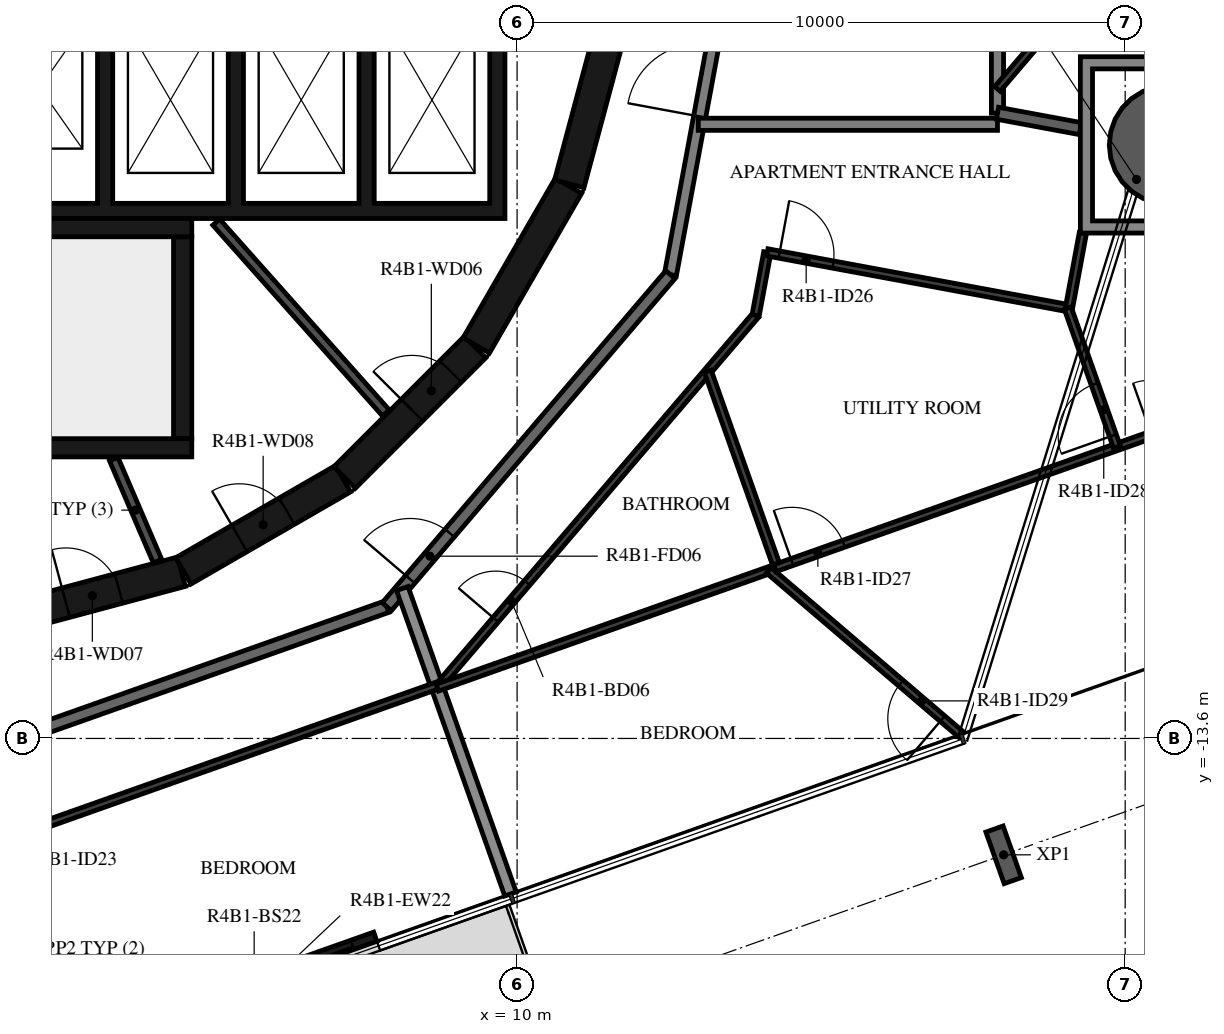
"""IFC4 building model, lengths in metres.
Left out: names, types, materials, properties, quantities, classifications, styles, units other than length and angle.
Written with IfcOpenShell. Run it as: python <this file> out.ifc"""

import sys

from ifc_helpers import new_model, si_unit, direction, frame, frame_2d, origin, origin_2d, place, context, subcontext, project, spatial, polyline, rectangle, hollow_circle, i_section, outline, extrude, element, fill, save


model = new_model("IFC4")
c1 = context("Model", 3, precision=1e-05, world=origin(), true_north=direction((0.0, 1.0)))
c2 = subcontext(c1, "Body", "Model", "MODEL_VIEW")
j1 = project(units=[si_unit("LENGTHUNIT", "METRE"), si_unit("PLANEANGLEUNIT", "RADIAN")], contexts=[c1])
p1 = place(None, origin())
s1 = spatial("IfcSite", under=j1, at=p1, CompositionType="ELEMENT")
p2 = place(p1, origin())
s2 = spatial("IfcBuilding", under=s1, at=p2, CompositionType="ELEMENT")
p3 = place(p2, frame((0.0, 0.0, 162.2)))
s3 = spatial("IfcBuildingStorey", under=s2, at=p3, CompositionType="ELEMENT", Elevation=162.2)
p4 = place(p3, frame((20.713, -3.839, -0.38), z_axis=(0.0, 0.0, 1.0), x_axis=(1.0, 0.0, 0.0)))
e1 = element("IfcColumn", 1, at=p4, inside=s3, PredefinedType="COLUMN", context=c2, shape_type="SweptSolid", body=[
    extrude(hollow_circle(Radius=0.975, WallThickness=0.045, at=origin_2d()), origin(), (0.0, 0.0, 1.0), 3.5),
])
p5 = place(p3, frame((18.001, -15.514, -0.38), z_axis=(0.0, 0.0, 1.0), x_axis=(-0.942641392079, -0.333807138839, 0.0)))
e2 = element("IfcColumn", 2, at=p5, inside=s3, PredefinedType="COLUMN", context=c2, shape_type="SweptSolid", body=[
    extrude(i_section(OverallWidth=0.3, OverallDepth=0.9, WebThickness=0.019, FlangeThickness=0.035, FilletRadius=0.03, at=origin_2d()), origin(), (0.0, 0.0, 1.0), 3.5),
])
p6 = place(p3, frame((4.652, -17.929, 0.0), z_axis=(0.0, 0.0, 1.0), x_axis=(0.942620722428, 0.333865502335, 0.0)))
e3 = element("IfcWall", 3, at=p6, inside=s3, PredefinedType="STANDARD", context=c2, shape_type="SweptSolid", body=[
    extrude(rectangle(XDim=3.2, YDim=0.16, at=frame_2d((1.6, 0.0))), origin(), (0.0, 0.0, 1.0), 3.12),
])
p7 = place(p6, frame((0.4, 0.0, 0.0)))
e4 = element("IfcOpeningElement", 4, at=p7, cuts=e3, PredefinedType="OPENING", context=c2, shape_type="SweptSolid", body=[
    extrude(rectangle(XDim=2.4, YDim=2.4, at=frame_2d((1.2, 1.2))), frame((0.0, 0.09, 0.0), z_axis=(0.0, -1.0, 0.0), x_axis=(1.0, 0.0, 0.0)), (0.0, 0.0, 1.0), 0.18),
])
p8 = place(p3, frame((1.55, -11.643, 0.0), z_axis=(0.0, 0.0, 1.0), x_axis=(0.965948410781, 0.258734743916, 0.0)))
e5 = element("IfcWall", 5, at=p8, inside=s3, PredefinedType="SHEAR", context=c2, shape_type="SweptSolid", body=[
    extrude(rectangle(XDim=3.033, YDim=0.5, at=frame_2d((1.516, 0.0))), origin(), (0.0, 0.0, 1.0), 3.12),
])
p9 = place(p8, frame((1.066, 0.0, 0.0)))
e6 = element("IfcOpeningElement", 6, at=p9, cuts=e5, PredefinedType="OPENING", context=c2, shape_type="SweptSolid", body=[
    extrude(rectangle(XDim=0.9, YDim=2.1, at=frame_2d((0.45, 1.05))), frame((0.0, 0.26, 0.0), z_axis=(0.0, -1.0, 0.0), x_axis=(1.0, 0.0, 0.0)), (0.0, 0.0, 1.0), 0.52),
])
p10 = place(p3, frame((4.51, -10.845, 0.0), z_axis=(0.0, 0.0, 1.0), x_axis=(0.865975092491, 0.500087131594, 0.0)))
e7 = element("IfcWall", 7, at=p10, inside=s3, PredefinedType="SHEAR", context=c2, shape_type="SweptSolid", body=[
    extrude(rectangle(XDim=3.033, YDim=0.5, at=frame_2d((1.516, 0.0))), origin(), (0.0, 0.0, 1.0), 3.12),
])
p11 = place(p10, frame((1.066, 0.0, 0.0)))
e8 = element("IfcOpeningElement", 8, at=p11, cuts=e7, PredefinedType="OPENING", context=c2, shape_type="SweptSolid", body=[
    extrude(rectangle(XDim=0.9, YDim=2.1, at=frame_2d((0.45, 1.05))), frame((0.0, 0.26, 0.0), z_axis=(0.0, -1.0, 0.0), x_axis=(1.0, 0.0, 0.0)), (0.0, 0.0, 1.0), 0.52),
])
p12 = place(p3, frame((7.164, -9.308, 0.0), z_axis=(0.0, 0.0, 1.0), x_axis=(0.707106781187, 0.707106781187, 0.0)))
e9 = element("IfcWall", 9, at=p12, inside=s3, PredefinedType="SHEAR", context=c2, shape_type="SweptSolid", body=[
    extrude(rectangle(XDim=3.032, YDim=0.5, at=frame_2d((1.516, 0.0))), origin(), (0.0, 0.0, 1.0), 3.12),
])
p13 = place(p12, frame((1.566, 0.0, 0.0)))
e10 = element("IfcOpeningElement", 10, at=p13, cuts=e9, PredefinedType="OPENING", context=c2, shape_type="SweptSolid", body=[
    extrude(rectangle(XDim=0.9, YDim=2.1, at=frame_2d((0.45, 1.05))), frame((0.0, 0.26, 0.0), z_axis=(0.0, -1.0, 0.0), x_axis=(1.0, 0.0, 0.0)), (0.0, 0.0, 1.0), 0.52),
])
for number, where, z_axis, x_axis in (
    (11, (9.329, -7.137, 0.0), (0.0, 0.0, 1.0), (0.5, 0.866, 0.0)),
    (12, (10.858, -4.479, 0.0), (0.0, 0.0, 1.0), (0.259, 0.966, 0.0)),
):
    element("IfcWall", number, at=place(p3, frame(where, z_axis=z_axis, x_axis=x_axis)), inside=s3, PredefinedType="SHEAR", context=c2, shape_type="SweptSolid", body=[
        extrude(rectangle(XDim=3.033, YDim=0.5, at=frame_2d((1.516, 0.0))), origin(), (0.0, 0.0, 1.0), 3.12),
    ])
p14 = place(p3, frame((-2.4, -5.2, 0.0), z_axis=(0.0, 0.0, 1.0), x_axis=(1.0, 0.0, 0.0)))
e13 = element("IfcWall", 13, at=p14, inside=s3, PredefinedType="SHEAR", context=c2, shape_type="SweptSolid", body=[
    extrude(rectangle(XDim=7.05, YDim=0.3, at=frame_2d((3.525, 0.0))), origin(), (0.0, 0.0, 1.0), 3.12),
])
p15 = place(p3, frame((4.5, -8.67, 0.0), z_axis=(0.0, 0.0, 1.0), x_axis=(0.0, 1.0, 0.0)))
e14 = element("IfcWall", 14, at=p15, inside=s3, PredefinedType="SHEAR", context=c2, shape_type="SweptSolid", body=[
    extrude(rectangle(XDim=3.32, YDim=0.3, at=frame_2d((1.66, 0.0))), origin(), (0.0, 0.0, 1.0), 3.12),
])
p16 = place(p3, frame((0.1, -8.82, 0.0), z_axis=(0.0, 0.0, 1.0), x_axis=(1.0, 0.0, 0.0)))
e15 = element("IfcWall", 15, at=p16, inside=s3, PredefinedType="SHEAR", context=c2, shape_type="SweptSolid", body=[
    extrude(rectangle(XDim=4.55, YDim=0.3, at=frame_2d((2.275, 0.0))), origin(), (0.0, 0.0, 1.0), 3.12),
])
p17 = place(p3, origin())
e16 = element("IfcWall", 16, at=p17, inside=s3, PredefinedType="SHEAR", context=c2, shape_type="SweptSolid", body=[
    extrude(outline(polyline([(9.8, -5.05), (9.8, -4.8), (9.8, -1.9), (9.55, -1.9), (9.55, -4.8), (7.65, -4.8), (7.65, -1.9), (7.4, -1.9), (7.4, -4.8), (5.5, -4.8), (5.5, -1.9), (5.25, -1.9), (5.25, -4.8), (3.35, -4.8), (3.35, -1.9), (3.1, -1.9), (3.1, -4.8), (1.2, -4.8), (1.2, -1.9), (0.95, -1.9), (0.95, -4.8), (-5.25, -4.8), (-5.25, -1.9), (-5.5, -1.9), (-5.5, -4.8), (-7.4, -4.8), (-7.4, -1.9), (-7.65, -1.9), (-7.65, -4.8), (-9.55, -4.8), (-9.55, -1.9), (-9.8, -1.9), (-9.8, -4.8), (-9.8, -5.05), (9.8, -5.05)])), origin(), (0.0, 0.0, 1.0), 3.12),
])
p18 = place(p3, frame((7.842, -8.248, 0.0), z_axis=(0.0, 0.0, 1.0), x_axis=(-0.66446128181, 0.747322691329, 0.0)))
e17 = element("IfcWall", 17, at=p18, inside=s3, PredefinedType="PARTITIONING", context=c2, shape_type="SweptSolid", body=[
    extrude(rectangle(XDim=4.198, YDim=0.15, at=frame_2d((2.099, 0.0))), origin(), (0.0, 0.0, 1.0), 3.12),
])
p19 = place(p3, frame((3.367, -9.007, 0.0), z_axis=(0.0, 0.0, 1.0), x_axis=(0.394387482265, -0.918944238696, 0.0)))
e18 = element("IfcWall", 18, at=p19, inside=s3, PredefinedType="PARTITIONING", context=c2, shape_type="SweptSolid", body=[
    extrude(rectangle(XDim=1.825, YDim=0.15, at=frame_2d((0.913, 0.0))), origin(), (0.0, 0.0, 1.0), 3.12),
])
p20 = place(p3, frame((12.521, -5.972, 0.0), z_axis=(0.0, 0.0, 1.0), x_axis=(0.182244189886, 0.983253301674, 0.0)))
e19 = element("IfcWall", 19, at=p20, inside=s3, PredefinedType="STANDARD", context=c2, shape_type="SweptSolid", body=[
    extrude(rectangle(XDim=4.176, YDim=0.2, at=frame_2d((2.088, 0.0))), origin(), (0.0, 0.0, 1.0), 3.12),
])
p21 = place(p20, frame((2.645, 0.0, 0.0)))
e20 = element("IfcOpeningElement", 20, at=p21, cuts=e19, PredefinedType="OPENING", context=c2, shape_type="SweptSolid", body=[
    extrude(rectangle(XDim=1.2, YDim=2.1, at=frame_2d((0.6, 1.05))), frame((0.0, 0.11, 0.0), z_axis=(0.0, -1.0, 0.0), x_axis=(1.0, 0.0, 0.0)), (0.0, 0.0, 1.0), 0.22),
])
p22 = place(p3, frame((1.088, -13.83, 0.0), z_axis=(0.0, 0.0, 1.0), x_axis=(0.942648397945, 0.333787354241, 0.0)))
e21 = element("IfcWall", 21, at=p22, inside=s3, PredefinedType="STANDARD", context=c2, shape_type="SweptSolid", body=[
    extrude(rectangle(XDim=7.181, YDim=0.2, at=frame_2d((3.591, 0.0))), origin(), (0.0, 0.0, 1.0), 3.12),
])
p23 = place(p3, frame((7.858, -11.433, 0.0), z_axis=(0.0, 0.0, 1.0), x_axis=(0.649440801937, 0.760412154545, 0.0)))
e22 = element("IfcWall", 22, at=p23, inside=s3, PredefinedType="STANDARD", context=c2, shape_type="SweptSolid", body=[
    extrude(rectangle(XDim=7.181, YDim=0.2, at=frame_2d((3.59, 0.0))), origin(), (0.0, 0.0, 1.0), 3.12),
])
p24 = place(p23, frame((0.592, 0.0, 0.0)))
e23 = element("IfcOpeningElement", 23, at=p24, cuts=e22, PredefinedType="OPENING", context=c2, shape_type="SweptSolid", body=[
    extrude(rectangle(XDim=1.0, YDim=2.1, at=frame_2d((0.5, 1.05))), frame((0.0, 0.11, 0.0), z_axis=(0.0, -1.0, 0.0), x_axis=(1.0, 0.0, 0.0)), (0.0, 0.0, 1.0), 0.22),
])
p25 = place(p3, frame((17.9, -3.318, 0.0), z_axis=(0.0, 0.0, 1.0), x_axis=(0.0, 1.0, 0.0)))
e24 = element("IfcWall", 24, at=p25, inside=s3, PredefinedType="STANDARD", context=c2, shape_type="SweptSolid", body=[
    extrude(rectangle(XDim=6.818, YDim=0.2, at=frame_2d((3.409, 0.0))), origin(), (0.0, 0.0, 1.0), 3.12),
])
p26 = place(p3, frame((12.979, -3.5, 0.0), z_axis=(0.0, 0.0, 1.0), x_axis=(1.0, 0.0, 0.0)))
e25 = element("IfcWall", 25, at=p26, inside=s3, PredefinedType="STANDARD", context=c2, shape_type="SweptSolid", body=[
    extrude(rectangle(XDim=4.92, YDim=0.2, at=frame_2d((2.46, 0.0))), origin(), (0.0, 0.0, 1.0), 3.12),
])
p27 = place(p3, frame((17.9, -3.319, 0.0), z_axis=(0.0, 0.0, 1.0), x_axis=(0.983246950753, -0.182278451375, 0.0)))
e26 = element("IfcWall", 26, at=p27, inside=s3, PredefinedType="STANDARD", context=c2, shape_type="SweptSolid", body=[
    extrude(rectangle(XDim=1.386, YDim=0.2, at=frame_2d((0.693, 0.0))), origin(), (0.0, 0.0, 1.0), 3.12),
])
p28 = place(p3, frame((9.891, -16.158, 0.0), z_axis=(0.0, 0.0, 1.0), x_axis=(-0.333807281402, 0.942641341594, 0.0)))
e27 = element("IfcWall", 27, at=p28, inside=s3, PredefinedType="STANDARD", context=c2, shape_type="SweptSolid", body=[
    extrude(rectangle(XDim=5.329, YDim=0.2, at=frame_2d((2.665, 0.0))), origin(), (0.0, 0.0, 1.0), 2.73),
])
p29 = place(p3, frame((17.9, -2.918, 0.0), z_axis=(0.0, 0.0, 1.0), x_axis=(0.649469887983, 0.760387312232, 0.0)))
e28 = element("IfcWall", 28, at=p29, inside=s3, PredefinedType="PARTITIONING", context=c2, shape_type="SweptSolid", body=[
    extrude(rectangle(XDim=5.527, YDim=0.12, at=frame_2d((2.763, 0.0))), origin(), (0.0, 0.0, 1.0), 3.12),
])
p30 = place(p29, frame((1.7, 0.0, 0.0)))
e29 = element("IfcOpeningElement", 29, at=p30, cuts=e28, PredefinedType="OPENING", context=c2, shape_type="SweptSolid", body=[
    extrude(rectangle(XDim=0.9, YDim=2.1, at=frame_2d((0.45, 1.05))), frame((0.0, 0.07, 0.0), z_axis=(0.0, -1.0, 0.0), x_axis=(1.0, 0.0, 0.0)), (0.0, 0.0, 1.0), 0.14),
])
p31 = place(p3, frame((1.269, -15.357, 0.0), z_axis=(0.0, 0.0, 1.0), x_axis=(0.942639442898, 0.333812643101, 0.0)))
e30 = element("IfcWall", 30, at=p31, inside=s3, PredefinedType="PARTITIONING", context=c2, shape_type="SweptSolid", body=[
    extrude(rectangle(XDim=7.86, YDim=0.12, at=frame_2d((3.93, 0.0))), origin(), (0.0, 0.0, 1.0), 3.12),
])
p32 = place(p31, frame((0.2, 0.0, 0.0)))
e31 = element("IfcOpeningElement", 31, at=p32, cuts=e30, PredefinedType="OPENING", context=c2, shape_type="SweptSolid", body=[
    extrude(rectangle(XDim=0.9, YDim=2.1, at=frame_2d((0.45, 1.05))), frame((0.0, 0.07, 0.0), z_axis=(0.0, -1.0, 0.0), x_axis=(1.0, 0.0, 0.0)), (0.0, 0.0, 1.0), 0.14),
])
p33 = place(p3, frame((2.482, -18.782, 0.0), z_axis=(0.0, 0.0, 1.0), x_axis=(-0.33379364943, 0.942646168825, 0.0)))
e32 = element("IfcWall", 32, at=p33, inside=s3, PredefinedType="PARTITIONING", context=c2, shape_type="SweptSolid", body=[
    extrude(rectangle(XDim=3.633, YDim=0.12, at=frame_2d((1.816, 0.0))), origin(), (0.0, 0.0, 1.0), 2.73),
])
p34 = place(p3, frame((8.737, -12.713, 0.0), z_axis=(0.0, 0.0, 1.0), x_axis=(0.649430604754, 0.760420863476, 0.0)))
e33 = element("IfcWall", 33, at=p34, inside=s3, PredefinedType="PARTITIONING", context=c2, shape_type="SweptSolid", body=[
    extrude(rectangle(XDim=7.985, YDim=0.12, at=frame_2d((3.992, 0.0))), origin(), (0.0, 0.0, 1.0), 3.12),
])
p35 = place(p34, frame((1.4, 0.0, 0.0)))
e34 = element("IfcOpeningElement", 34, at=p35, cuts=e33, PredefinedType="OPENING", context=c2, shape_type="SweptSolid", body=[
    extrude(rectangle(XDim=0.8, YDim=2.1, at=frame_2d((0.4, 1.05))), frame((0.0, 0.07, 0.0), z_axis=(0.0, -1.0, 0.0), x_axis=(1.0, 0.0, 0.0)), (0.0, 0.0, 1.0), 0.14),
])
p36 = place(p3, frame((13.923, -6.641, 0.0), z_axis=(0.0, 0.0, 1.0), x_axis=(0.182396711264, 0.983225019881, 0.0)))
e35 = element("IfcWall", 35, at=p36, inside=s3, PredefinedType="PARTITIONING", context=c2, shape_type="SweptSolid", body=[
    extrude(rectangle(XDim=1.052, YDim=0.12, at=frame_2d((0.526, 0.0))), origin(), (0.0, 0.0, 1.0), 3.12),
])
p37 = place(p3, frame((14.115, -5.606, 0.0), z_axis=(0.0, 0.0, 1.0), x_axis=(0.983252350103, -0.182249323775, 0.0)))
e36 = element("IfcWall", 36, at=p37, inside=s3, PredefinedType="PARTITIONING", context=c2, shape_type="SweptSolid", body=[
    extrude(rectangle(XDim=5.025, YDim=0.12, at=frame_2d((2.512, 0.0))), origin(), (0.0, 0.0, 1.0), 3.12),
])
p38 = place(p37, frame((0.2, 0.0, 0.0)))
e37 = element("IfcOpeningElement", 37, at=p38, cuts=e36, PredefinedType="OPENING", context=c2, shape_type="SweptSolid", body=[
    extrude(rectangle(XDim=0.9, YDim=2.1, at=frame_2d((0.45, 1.05))), frame((0.0, 0.07, 0.0), z_axis=(0.0, -1.0, 0.0), x_axis=(1.0, 0.0, 0.0)), (0.0, 0.0, 1.0), 0.14),
])
p39 = place(p3, frame((19.075, -6.526, 0.0), z_axis=(0.0, 0.0, 1.0), x_axis=(0.182283897093, 0.983245941187, 0.0)))
e38 = element("IfcWall", 38, at=p39, inside=s3, PredefinedType="PARTITIONING", context=c2, shape_type="SweptSolid", body=[
    extrude(rectangle(XDim=1.258, YDim=0.12, at=frame_2d((0.629, 0.0))), origin(), (0.0, 0.0, 1.0), 3.12),
])
p40 = place(p3, frame((14.183, -10.819, 0.0), z_axis=(0.0, 0.0, 1.0), x_axis=(-0.942646448855, -0.333792858612, 0.0)))
e39 = element("IfcWall", 39, at=p40, inside=s3, PredefinedType="PARTITIONING", context=c2, shape_type="SweptSolid", body=[
    extrude(rectangle(XDim=5.828, YDim=0.12, at=frame_2d((2.914, 0.0))), origin(), (0.0, 0.0, 1.0), 3.12),
])
p41 = place(p3, frame((17.3, -13.534, 0.0), z_axis=(0.0, 0.0, 1.0), x_axis=(-0.760428665789, 0.649421468883, 0.0)))
e40 = element("IfcWall", 40, at=p41, inside=s3, PredefinedType="PARTITIONING", context=c2, shape_type="SweptSolid", body=[
    extrude(rectangle(XDim=4.157, YDim=0.12, at=frame_2d((2.078, 0.0))), origin(), (0.0, 0.0, 1.0), 3.12),
])
p42 = place(p41, frame((0.4, 0.0, 0.0)))
e41 = element("IfcOpeningElement", 41, at=p42, cuts=e40, PredefinedType="OPENING", context=c2, shape_type="SweptSolid", body=[
    extrude(rectangle(XDim=0.9, YDim=2.1, at=frame_2d((0.45, 1.05))), frame((0.0, 0.07, 0.0), z_axis=(0.0, -1.0, 0.0), x_axis=(1.0, 0.0, 0.0)), (0.0, 0.0, 1.0), 0.14),
])
p43 = place(p3, frame((14.277, -10.786, 0.0), z_axis=(0.0, 0.0, 1.0), x_axis=(-0.333865646111, 0.942620671504, 0.0)))
e42 = element("IfcWall", 42, at=p43, inside=s3, PredefinedType="PARTITIONING", context=c2, shape_type="SweptSolid", body=[
    extrude(rectangle(XDim=3.419, YDim=0.12, at=frame_2d((1.71, 0.0))), origin(), (0.0, 0.0, 1.0), 3.12),
])
p44 = place(p3, frame((14.239, -10.799, 0.0), z_axis=(0.0, 0.0, 1.0), x_axis=(0.94264202959, 0.333805338558, 0.0)))
e43 = element("IfcWall", 43, at=p44, inside=s3, PredefinedType="PARTITIONING", context=c2, shape_type="SweptSolid", body=[
    extrude(rectangle(XDim=8.216, YDim=0.12, at=frame_2d((4.108, 0.0))), origin(), (0.0, 0.0, 1.0), 3.12),
])
p45 = place(p44, frame((0.3, 0.0, 0.0)))
e44 = element("IfcOpeningElement", 44, at=p45, cuts=e43, PredefinedType="OPENING", context=c2, shape_type="SweptSolid", body=[
    extrude(rectangle(XDim=0.9, YDim=2.1, at=frame_2d((0.45, 1.05))), frame((0.0, 0.07, 0.0), z_axis=(0.0, -1.0, 0.0), x_axis=(1.0, 0.0, 0.0)), (0.0, 0.0, 1.0), 0.14),
])
p46 = place(p44, frame((6.568, 0.0, 0.0)))
e45 = element("IfcOpeningElement", 45, at=p46, cuts=e43, PredefinedType="OPENING", context=c2, shape_type="SweptSolid", body=[
    extrude(rectangle(XDim=0.9, YDim=2.1, at=frame_2d((0.45, 1.05))), frame((0.0, 0.07, 0.0), z_axis=(0.0, -1.0, 0.0), x_axis=(1.0, 0.0, 0.0)), (0.0, 0.0, 1.0), 0.14),
])
p47 = place(p3, frame((19.865, -8.807, 0.0), z_axis=(0.0, 0.0, 1.0), x_axis=(-0.33378934261, 0.942647693871, 0.0)))
e46 = element("IfcWall", 46, at=p47, inside=s3, PredefinedType="PARTITIONING", context=c2, shape_type="SweptSolid", body=[
    extrude(rectangle(XDim=2.424, YDim=0.12, at=frame_2d((1.212, 0.0))), origin(), (0.0, 0.0, 1.0), 3.12),
])
p48 = place(p47, frame((0.2, 0.0, 0.0)))
e47 = element("IfcOpeningElement", 47, at=p48, cuts=e46, PredefinedType="OPENING", context=c2, shape_type="SweptSolid", body=[
    extrude(rectangle(XDim=0.9, YDim=2.1, at=frame_2d((0.45, 1.05))), frame((0.0, 0.07, 0.0), z_axis=(0.0, -1.0, 0.0), x_axis=(1.0, 0.0, 0.0)), (0.0, 0.0, 1.0), 0.14),
])
p49 = place(p3, origin())
e48 = element("IfcWall", 48, at=p49, inside=s3, PredefinedType="STANDARD", context=c2, shape_type="SweptSolid", body=[
    extrude(outline(polyline([(22.163, -2.389), (22.163, -5.289), (19.263, -5.289), (19.263, -2.389), (22.163, -2.389)]), holes=[polyline([(19.463, -5.089), (21.963, -5.089), (21.963, -2.589), (19.463, -2.589), (19.463, -5.089)])]), origin(), (0.0, 0.0, 1.0), 3.12),
])
p50 = place(p7, origin())
e49 = element("IfcDoor", 49, at=p50, inside=s3, OperationType="DOUBLE_DOOR_SLIDING", PredefinedType="DOOR", context=c2, shape_type="SweptSolid", body=[
    extrude(rectangle(XDim=2.4, YDim=2.4, at=frame_2d((1.2, 1.2))), frame((0.0, 0.025, 0.0), z_axis=(0.0, -1.0, 0.0), x_axis=(1.0, 0.0, 0.0)), (0.0, 0.0, 1.0), 0.05),
])
fill(e4, e49)
p51 = place(p13, origin())
e50 = element("IfcDoor", 50, at=p51, inside=s3, OperationType="SINGLE_SWING_RIGHT", PredefinedType="DOOR", context=c2, shape_type="SweptSolid", body=[
    extrude(rectangle(XDim=0.9, YDim=2.1, at=frame_2d((0.45, 1.05))), frame((0.0, 0.025, 0.0), z_axis=(0.0, -1.0, 0.0), x_axis=(1.0, 0.0, 0.0)), (0.0, 0.0, 1.0), 0.05),
])
fill(e10, e50)
p52 = place(p9, origin())
e51 = element("IfcDoor", 51, at=p52, inside=s3, OperationType="SINGLE_SWING_LEFT", PredefinedType="DOOR", context=c2, shape_type="SweptSolid", body=[
    extrude(rectangle(XDim=0.9, YDim=2.1, at=frame_2d((0.45, 1.05))), frame((0.0, 0.025, 0.0), z_axis=(0.0, -1.0, 0.0), x_axis=(1.0, 0.0, 0.0)), (0.0, 0.0, 1.0), 0.05),
])
fill(e6, e51)
p53 = place(p11, origin())
e52 = element("IfcDoor", 52, at=p53, inside=s3, OperationType="SINGLE_SWING_RIGHT", PredefinedType="DOOR", context=c2, shape_type="SweptSolid", body=[
    extrude(rectangle(XDim=0.9, YDim=2.1, at=frame_2d((0.45, 1.05))), frame((0.0, 0.025, 0.0), z_axis=(0.0, -1.0, 0.0), x_axis=(1.0, 0.0, 0.0)), (0.0, 0.0, 1.0), 0.05),
])
fill(e8, e52)
p54 = place(p24, origin())
e53 = element("IfcDoor", 53, at=p54, inside=s3, OperationType="SINGLE_SWING_RIGHT", PredefinedType="DOOR", context=c2, shape_type="SweptSolid", body=[
    extrude(rectangle(XDim=1.0, YDim=2.1, at=frame_2d((0.5, 1.05))), frame((0.0, 0.025, 0.0), z_axis=(0.0, -1.0, 0.0), x_axis=(1.0, 0.0, 0.0)), (0.0, 0.0, 1.0), 0.05),
])
fill(e23, e53)
p55 = place(p35, origin())
e54 = element("IfcDoor", 54, at=p55, inside=s3, OperationType="SINGLE_SWING_RIGHT", PredefinedType="DOOR", context=c2, shape_type="SweptSolid", body=[
    extrude(rectangle(XDim=0.8, YDim=2.1, at=frame_2d((0.4, 1.05))), frame((0.0, 0.025, 0.0), z_axis=(0.0, -1.0, 0.0), x_axis=(1.0, 0.0, 0.0)), (0.0, 0.0, 1.0), 0.05),
])
fill(e34, e54)
p56 = place(p38, origin())
e55 = element("IfcDoor", 55, at=p56, inside=s3, OperationType="SINGLE_SWING_RIGHT", PredefinedType="DOOR", context=c2, shape_type="SweptSolid", body=[
    extrude(rectangle(XDim=0.9, YDim=2.1, at=frame_2d((0.45, 1.05))), frame((0.0, 0.025, 0.0), z_axis=(0.0, -1.0, 0.0), x_axis=(1.0, 0.0, 0.0)), (0.0, 0.0, 1.0), 0.05),
])
fill(e37, e55)
p57 = place(p45, origin())
e56 = element("IfcDoor", 56, at=p57, inside=s3, OperationType="SINGLE_SWING_RIGHT", PredefinedType="DOOR", context=c2, shape_type="SweptSolid", body=[
    extrude(rectangle(XDim=0.9, YDim=2.1, at=frame_2d((0.45, 1.05))), frame((0.0, 0.025, 0.0), z_axis=(0.0, -1.0, 0.0), x_axis=(1.0, 0.0, 0.0)), (0.0, 0.0, 1.0), 0.05),
])
fill(e44, e56)
p58 = place(p48, origin())
e57 = element("IfcDoor", 57, at=p58, inside=s3, OperationType="SINGLE_SWING_RIGHT", PredefinedType="DOOR", context=c2, shape_type="SweptSolid", body=[
    extrude(rectangle(XDim=0.9, YDim=2.1, at=frame_2d((0.45, 1.05))), frame((0.0, 0.025, 0.0), z_axis=(0.0, -1.0, 0.0), x_axis=(1.0, 0.0, 0.0)), (0.0, 0.0, 1.0), 0.05),
])
fill(e47, e57)
p59 = place(p42, origin())
e58 = element("IfcDoor", 58, at=p59, inside=s3, OperationType="SINGLE_SWING_LEFT", PredefinedType="DOOR", context=c2, shape_type="SweptSolid", body=[
    extrude(rectangle(XDim=0.9, YDim=2.1, at=frame_2d((0.45, 1.05))), frame((0.0, 0.025, 0.0), z_axis=(0.0, -1.0, 0.0), x_axis=(1.0, 0.0, 0.0)), (0.0, 0.0, 1.0), 0.05),
])
fill(e41, e58)
p60 = place(p21, origin())
e59 = element("IfcDoor", 59, at=p60, inside=s3, OperationType="DOUBLE_DOOR_SINGLE_SWING", PredefinedType="DOOR", context=c2, shape_type="SweptSolid", body=[
    extrude(rectangle(XDim=1.2, YDim=2.1, at=frame_2d((0.6, 1.05))), frame((0.0, 0.025, 0.0), z_axis=(0.0, -1.0, 0.0), x_axis=(1.0, 0.0, 0.0)), (0.0, 0.0, 1.0), 0.05),
])
fill(e20, e59)
save(model, sys.argv[1])
